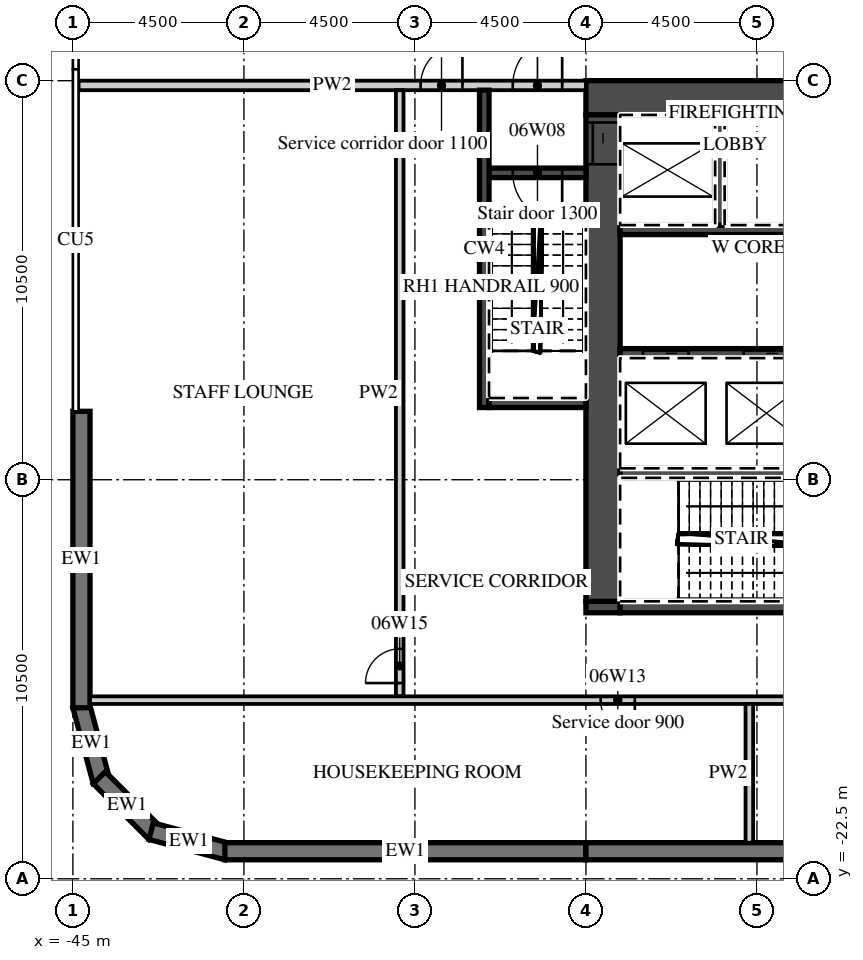
"""IFC4 building model, lengths in metres.
Left out: names, types, materials, properties, quantities, classifications, styles, units other than length and angle.
Written with IfcOpenShell. Run it as: python <this file> out.ifc"""

import sys

from ifc_helpers import new_model, si_unit, direction, frame, frame_2d, origin, place, context, subcontext, project, spatial, polyline, rectangle, outline, extrude, element, fill, save


model = new_model("IFC4")
c1 = context("Model", 3, precision=1e-05, world=origin(), true_north=direction((0.0, 1.0)))
c2 = subcontext(c1, "Body", "Model", "MODEL_VIEW")
j1 = project(units=[si_unit("LENGTHUNIT", "METRE"), si_unit("PLANEANGLEUNIT", "RADIAN")], contexts=[c1])
p1 = place(None, origin())
s1 = spatial("IfcSite", under=j1, at=p1, CompositionType="ELEMENT")
p2 = place(p1, origin())
s2 = spatial("IfcBuilding", under=s1, at=p2, CompositionType="ELEMENT")
p3 = place(p2, frame((0.0, 0.0, 38.0)))
s3 = spatial("IfcBuildingStorey", under=s2, at=p3, CompositionType="ELEMENT", Elevation=38.0)
p4 = place(p3, frame((-44.783, -17.942, 0.0), z_axis=(0.0, 0.0, 1.0), x_axis=(0.25881466832, -0.965926999034, 0.0)))
e1 = element("IfcWall", 1, at=p4, inside=s3, PredefinedType="SOLIDWALL", context=c2, shape_type="SweptSolid", body=[
    extrude(outline(polyline([(0.0, -0.225), (2.071, -0.225), (1.95, 0.225), (0.121, 0.225), (0.0, -0.225)])), origin(), (0.0, 0.0, 1.0), 8.7),
])
p5 = place(p3, frame((-44.305, -19.841, 0.0), z_axis=(0.0, 0.0, 1.0), x_axis=(0.707106781187, -0.707106781187, 0.0)))
e2 = element("IfcWall", 2, at=p5, inside=s3, PredefinedType="SOLIDWALL", context=c2, shape_type="SweptSolid", body=[
    extrude(outline(polyline([(0.0, -0.225), (2.071, -0.225), (1.95, 0.225), (0.121, 0.225), (0.0, -0.225)])), origin(), (0.0, 0.0, 1.0), 8.7),
])
p6 = place(p3, frame((-42.942, -21.247, 0.0), z_axis=(0.0, 0.0, 1.0), x_axis=(0.965926999034, -0.25881466832, 0.0)))
e3 = element("IfcWall", 3, at=p6, inside=s3, PredefinedType="SOLIDWALL", context=c2, shape_type="SweptSolid", body=[
    extrude(outline(polyline([(-0.0, -0.225), (2.07, -0.225), (1.95, 0.225), (0.12, 0.225), (-0.0, -0.225)])), origin(), (0.0, 0.0, 1.0), 8.7),
])
p7 = place(p3, frame((-41.0, -21.775, 0.0), z_axis=(0.0, 0.0, 1.0), x_axis=(1.0, 0.0, 0.0)))
e4 = element("IfcWall", 4, at=p7, inside=s3, PredefinedType="SOLIDWALL", context=c2, shape_type="SweptSolid", body=[
    extrude(rectangle(XDim=9.5, YDim=0.45, at=frame_2d((4.75, 0.0))), origin(), (0.0, 0.0, 1.0), 8.7),
])
p8 = place(p3, frame((-31.5, -21.775, 0.0), z_axis=(0.0, 0.0, 1.0), x_axis=(1.0, 0.0, 0.0)))
e5 = element("IfcWall", 5, at=p8, inside=s3, PredefinedType="SOLIDWALL", context=c2, shape_type="SweptSolid", body=[
    extrude(rectangle(XDim=18.0, YDim=0.45, at=frame_2d((9.0, 0.0))), origin(), (0.0, 0.0, 1.0), 8.7),
])
p9 = place(p3, frame((-44.775, -10.2, 0.0), z_axis=(0.0, 0.0, 1.0), x_axis=(0.0, -1.0, 0.0)))
e6 = element("IfcWall", 6, at=p9, inside=s3, PredefinedType="SOLIDWALL", context=c2, shape_type="SweptSolid", body=[
    extrude(rectangle(XDim=7.8, YDim=0.45, at=frame_2d((3.9, 0.0))), origin(), (0.0, 0.0, 1.0), 8.7),
])
p10 = place(p3, frame((-31.5, -1.95, 0.0), z_axis=(0.0, 0.0, 1.0), x_axis=(1.0, 0.0, 0.0)))
e7 = element("IfcWall", 7, at=p10, inside=s3, PredefinedType="SHEAR", context=c2, shape_type="SweptSolid", body=[
    extrude(rectangle(XDim=18.0, YDim=0.9, at=frame_2d((9.0, 0.0))), origin(), (0.0, 0.0, 1.0), 8.7),
])
p11 = place(p10, frame((14.725, 0.0, 0.0)))
e8 = element("IfcOpeningElement", 8, at=p11, cuts=e7, PredefinedType="OPENING", context=c2, shape_type="SweptSolid", body=[
    extrude(rectangle(XDim=1.8, YDim=2.1, at=frame_2d((0.9, 1.05))), frame((0.0, 0.46, 0.0), z_axis=(0.0, -1.0, 0.0), x_axis=(1.0, 0.0, 0.0)), (0.0, 0.0, 1.0), 0.92),
])
p12 = place(p3, frame((-31.5, -15.35, 0.0), z_axis=(0.0, 0.0, 1.0), x_axis=(1.0, 0.0, 0.0)))
e9 = element("IfcWall", 9, at=p12, inside=s3, PredefinedType="SHEAR", context=c2, shape_type="SweptSolid", body=[
    extrude(rectangle(XDim=0.9, YDim=0.3, at=frame_2d((0.45, 0.0))), origin(), (0.0, 0.0, 1.0), 8.7),
])
p13 = place(p3, frame((-30.6, -15.35, 0.0), z_axis=(0.0, 0.0, 1.0), x_axis=(1.0, 0.0, 0.0)))
e10 = element("IfcWall", 10, at=p13, inside=s3, PredefinedType="SHEAR", context=c2, shape_type="SweptSolid", body=[
    extrude(rectangle(XDim=10.3, YDim=0.3, at=frame_2d((5.15, 0.0))), origin(), (0.0, 0.0, 1.0), 8.7),
])
p14 = place(p13, frame((5.0, 0.0, 0.0)))
e11 = element("IfcOpeningElement", 11, at=p14, cuts=e10, PredefinedType="OPENING", context=c2, shape_type="SweptSolid", body=[
    extrude(rectangle(XDim=1.3, YDim=2.1, at=frame_2d((0.65, 1.05))), frame((0.0, 0.16, 0.0), z_axis=(0.0, -1.0, 0.0), x_axis=(1.0, 0.0, 0.0)), (0.0, 0.0, 1.0), 0.32),
])
p15 = place(p13, frame((7.312, 0.0, 0.0)))
e12 = element("IfcOpeningElement", 12, at=p15, cuts=e10, PredefinedType="OPENING", context=c2, shape_type="SweptSolid", body=[
    extrude(rectangle(XDim=0.9, YDim=2.1, at=frame_2d((0.45, 1.05))), frame((0.0, 0.16, 0.0), z_axis=(0.0, -1.0, 0.0), x_axis=(1.0, 0.0, 0.0)), (0.0, 0.0, 1.0), 0.32),
])
p16 = place(p3, frame((-31.05, -15.2, 0.0), z_axis=(0.0, 0.0, 1.0), x_axis=(0.0, 1.0, 0.0)))
e13 = element("IfcWall", 13, at=p16, inside=s3, PredefinedType="SHEAR", context=c2, shape_type="SweptSolid", body=[
    extrude(rectangle(XDim=12.8, YDim=0.9, at=frame_2d((6.4, 0.0))), origin(), (0.0, 0.0, 1.0), 8.7),
])
p17 = place(p16, frame((11.5, 0.0, 0.0)))
e14 = element("IfcOpeningElement", 14, at=p17, cuts=e13, PredefinedType="OPENING", context=c2, shape_type="SweptSolid", body=[
    extrude(rectangle(XDim=1.1, YDim=2.1, at=frame_2d((0.55, 1.05))), frame((0.0, 0.46, 0.0), z_axis=(0.0, -1.0, 0.0), x_axis=(1.0, 0.0, 0.0)), (0.0, 0.0, 1.0), 0.92),
])
p18 = place(p3, frame((-30.6, -5.425, 0.0), z_axis=(0.0, 0.0, 1.0), x_axis=(1.0, 0.0, 0.0)))
e15 = element("IfcWall", 15, at=p18, inside=s3, PredefinedType="SHEAR", context=c2, shape_type="SweptSolid", body=[
    extrude(rectangle(XDim=13.0, YDim=0.25, at=frame_2d((6.5, 0.0))), origin(), (0.0, 0.0, 1.0), 8.7),
])
p19 = place(p3, frame((-27.975, -5.3, 0.0), z_axis=(0.0, 0.0, 1.0), x_axis=(0.0, 1.0, 0.0)))
e16 = element("IfcWall", 16, at=p19, inside=s3, PredefinedType="SHEAR", context=c2, shape_type="SweptSolid", body=[
    extrude(rectangle(XDim=2.9, YDim=0.25, at=frame_2d((1.45, 0.0))), origin(), (0.0, 0.0, 1.0), 8.7),
])
p20 = place(p3, frame((-30.6, -8.675, 0.0), z_axis=(0.0, 0.0, 1.0), x_axis=(1.0, 0.0, 0.0)))
e17 = element("IfcWall", 17, at=p20, inside=s3, PredefinedType="SHEAR", context=c2, shape_type="SweptSolid", body=[
    extrude(rectangle(XDim=16.2, YDim=0.25, at=frame_2d((8.1, 0.0))), origin(), (0.0, 0.0, 1.0), 8.7),
])
p21 = place(p20, frame((0.6, 0.0, 0.0)))
e18 = element("IfcOpeningElement", 18, at=p21, cuts=e17, PredefinedType="OPENING", context=c2, shape_type="SweptSolid", body=[
    extrude(rectangle(XDim=1.2, YDim=2.1, at=frame_2d((0.6, 1.05))), frame((0.0, 0.135, 0.0), z_axis=(0.0, -1.0, 0.0), x_axis=(1.0, 0.0, 0.0)), (0.0, 0.0, 1.0), 0.27),
])
p22 = place(p20, frame((3.25, 0.0, 0.0)))
e19 = element("IfcOpeningElement", 19, at=p22, cuts=e17, PredefinedType="OPENING", context=c2, shape_type="SweptSolid", body=[
    extrude(rectangle(XDim=1.2, YDim=2.1, at=frame_2d((0.6, 1.05))), frame((0.0, 0.135, 0.0), z_axis=(0.0, -1.0, 0.0), x_axis=(1.0, 0.0, 0.0)), (0.0, 0.0, 1.0), 0.27),
])
p23 = place(p20, frame((5.9, 0.0, 0.0)))
e20 = element("IfcOpeningElement", 20, at=p23, cuts=e17, PredefinedType="OPENING", context=c2, shape_type="SweptSolid", body=[
    extrude(rectangle(XDim=1.2, YDim=2.1, at=frame_2d((0.6, 1.05))), frame((0.0, 0.135, 0.0), z_axis=(0.0, -1.0, 0.0), x_axis=(1.0, 0.0, 0.0)), (0.0, 0.0, 1.0), 0.27),
])
p24 = place(p20, frame((14.25, 0.0, 0.0)))
e21 = element("IfcOpeningElement", 21, at=p24, cuts=e17, PredefinedType="OPENING", context=c2, shape_type="SweptSolid", body=[
    extrude(rectangle(XDim=1.3, YDim=2.1, at=frame_2d((0.65, 1.05))), frame((0.0, 0.135, 0.0), z_axis=(0.0, -1.0, 0.0), x_axis=(1.0, 0.0, 0.0)), (0.0, 0.0, 1.0), 0.27),
])
p25 = place(p3, frame((-30.6, -11.825, 0.0), z_axis=(0.0, 0.0, 1.0), x_axis=(1.0, 0.0, 0.0)))
e22 = element("IfcWall", 22, at=p25, inside=s3, PredefinedType="SHEAR", context=c2, shape_type="SweptSolid", body=[
    extrude(rectangle(XDim=13.25, YDim=0.25, at=frame_2d((6.625, 0.0))), origin(), (0.0, 0.0, 1.0), 8.7),
])
p26 = place(p3, frame((-44.85, -1.625, 0.0), z_axis=(0.0, 0.0, 1.0), x_axis=(1.0, 0.0, 0.0)))
e23 = element("IfcWall", 23, at=p26, inside=s3, PredefinedType="PARTITIONING", context=c2, shape_type="SweptSolid", body=[
    extrude(rectangle(XDim=13.35, YDim=0.25, at=frame_2d((6.675, 0.0))), origin(), (0.0, 0.0, 1.0), 8.7),
])
p27 = place(p26, frame((11.425, 0.0, 0.0)))
e24 = element("IfcOpeningElement", 24, at=p27, cuts=e23, PredefinedType="OPENING", context=c2, shape_type="SweptSolid", body=[
    extrude(rectangle(XDim=1.3, YDim=2.1, at=frame_2d((0.65, 1.05))), frame((0.0, 0.135, 0.0), z_axis=(0.0, -1.0, 0.0), x_axis=(1.0, 0.0, 0.0)), (0.0, 0.0, 1.0), 0.27),
])
p28 = place(p26, frame((9.0, 0.0, 0.0)))
e25 = element("IfcOpeningElement", 25, at=p28, cuts=e23, PredefinedType="OPENING", context=c2, shape_type="SweptSolid", body=[
    extrude(rectangle(XDim=1.1, YDim=2.1, at=frame_2d((0.55, 1.05))), frame((0.0, 0.135, 0.0), z_axis=(0.0, -1.0, 0.0), x_axis=(1.0, 0.0, 0.0)), (0.0, 0.0, 1.0), 0.27),
])
p29 = place(p3, frame((-34.05, -3.925, 0.0), z_axis=(0.0, 0.0, 1.0), x_axis=(1.0, 0.0, 0.0)))
e26 = element("IfcWall", 26, at=p29, inside=s3, PredefinedType="SHEAR", context=c2, shape_type="SweptSolid", body=[
    extrude(rectangle(XDim=2.55, YDim=0.25, at=frame_2d((1.275, 0.0))), origin(), (0.0, 0.0, 1.0), 8.7),
])
p30 = place(p29, frame((0.625, 0.0, 0.0)))
e27 = element("IfcOpeningElement", 27, at=p30, cuts=e26, PredefinedType="OPENING", context=c2, shape_type="SweptSolid", body=[
    extrude(rectangle(XDim=1.3, YDim=2.1, at=frame_2d((0.65, 1.05))), frame((0.0, 0.135, 0.0), z_axis=(0.0, -1.0, 0.0), x_axis=(1.0, 0.0, 0.0)), (0.0, 0.0, 1.0), 0.27),
])
p31 = place(p3, frame((-34.175, -10.1, 0.0), z_axis=(0.0, 0.0, 1.0), x_axis=(0.0, 1.0, 0.0)))
e28 = element("IfcWall", 28, at=p31, inside=s3, PredefinedType="SHEAR", context=c2, shape_type="SweptSolid", body=[
    extrude(rectangle(XDim=8.35, YDim=0.25, at=frame_2d((4.175, 0.0))), origin(), (0.0, 0.0, 1.0), 8.7),
])
p32 = place(p3, frame((-34.05, -9.975, 0.0), z_axis=(0.0, 0.0, 1.0), x_axis=(1.0, 0.0, 0.0)))
e29 = element("IfcWall", 29, at=p32, inside=s3, PredefinedType="SHEAR", context=c2, shape_type="SweptSolid", body=[
    extrude(rectangle(XDim=2.55, YDim=0.25, at=frame_2d((1.275, 0.0))), origin(), (0.0, 0.0, 1.0), 8.7),
])
p33 = place(p3, frame((-36.4, -17.7, 0.0), z_axis=(0.0, 0.0, 1.0), x_axis=(0.0, 1.0, 0.0)))
e30 = element("IfcWall", 30, at=p33, inside=s3, PredefinedType="PARTITIONING", context=c2, shape_type="SweptSolid", body=[
    extrude(rectangle(XDim=15.95, YDim=0.2, at=frame_2d((7.975, 0.0))), origin(), (0.0, 0.0, 1.0), 8.7),
])
p34 = place(p33, frame((0.35, 0.0, 0.0)))
e31 = element("IfcOpeningElement", 31, at=p34, cuts=e30, PredefinedType="OPENING", context=c2, shape_type="SweptSolid", body=[
    extrude(rectangle(XDim=0.9, YDim=2.1, at=frame_2d((0.45, 1.05))), frame((0.0, 0.11, 0.0), z_axis=(0.0, -1.0, 0.0), x_axis=(1.0, 0.0, 0.0)), (0.0, 0.0, 1.0), 0.22),
])
p35 = place(p3, frame((-44.55, -17.8, 0.0), z_axis=(0.0, 0.0, 1.0), x_axis=(1.0, 0.0, 0.0)))
e32 = element("IfcWall", 32, at=p35, inside=s3, PredefinedType="PARTITIONING", context=c2, shape_type="SweptSolid", body=[
    extrude(rectangle(XDim=30.95, YDim=0.2, at=frame_2d((15.475, 0.0))), origin(), (0.0, 0.0, 1.0), 8.7),
])
p36 = place(p35, frame((13.438, 0.0, 0.0)))
e33 = element("IfcOpeningElement", 33, at=p36, cuts=e32, PredefinedType="OPENING", context=c2, shape_type="SweptSolid", body=[
    extrude(rectangle(XDim=0.9, YDim=2.1, at=frame_2d((0.45, 1.05))), frame((0.0, 0.11, 0.0), z_axis=(0.0, -1.0, 0.0), x_axis=(1.0, 0.0, 0.0)), (0.0, 0.0, 1.0), 0.22),
])
p37 = place(p35, frame((21.738, 0.0, 0.0)))
e34 = element("IfcOpeningElement", 34, at=p37, cuts=e32, PredefinedType="OPENING", context=c2, shape_type="SweptSolid", body=[
    extrude(rectangle(XDim=0.9, YDim=2.1, at=frame_2d((0.45, 1.05))), frame((0.0, 0.11, 0.0), z_axis=(0.0, -1.0, 0.0), x_axis=(1.0, 0.0, 0.0)), (0.0, 0.0, 1.0), 0.22),
])
p38 = place(p3, frame((-27.2, -21.55, 0.0), z_axis=(0.0, 0.0, 1.0), x_axis=(0.0, 1.0, 0.0)))
e35 = element("IfcWall", 35, at=p38, inside=s3, PredefinedType="PARTITIONING", context=c2, shape_type="SweptSolid", body=[
    extrude(rectangle(XDim=3.65, YDim=0.2, at=frame_2d((1.825, 0.0))), origin(), (0.0, 0.0, 1.0), 8.7),
])
p39 = place(p21, origin())
e36 = element("IfcDoor", 36, at=p39, inside=s3, OperationType="SLIDING_TO_LEFT", PredefinedType="DOOR", context=c2, shape_type="SweptSolid", body=[
    extrude(rectangle(XDim=1.2, YDim=2.1, at=frame_2d((0.6, 1.05))), frame((0.0, 0.025, 0.0), z_axis=(0.0, -1.0, 0.0), x_axis=(1.0, 0.0, 0.0)), (0.0, 0.0, 1.0), 0.05),
])
fill(e18, e36)
p40 = place(p22, origin())
e37 = element("IfcDoor", 37, at=p40, inside=s3, OperationType="SLIDING_TO_RIGHT", PredefinedType="DOOR", context=c2, shape_type="SweptSolid", body=[
    extrude(rectangle(XDim=1.2, YDim=2.1, at=frame_2d((0.6, 1.05))), frame((0.0, 0.025, 0.0), z_axis=(0.0, -1.0, 0.0), x_axis=(1.0, 0.0, 0.0)), (0.0, 0.0, 1.0), 0.05),
])
fill(e19, e37)
p41 = place(p17, origin())
e38 = element("IfcDoor", 38, at=p41, inside=s3, OperationType="SLIDING_TO_RIGHT", PredefinedType="DOOR", context=c2, shape_type="SweptSolid", body=[
    extrude(rectangle(XDim=1.1, YDim=2.1, at=frame_2d((0.55, 1.05))), frame((0.0, 0.025, 0.0), z_axis=(0.0, -1.0, 0.0), x_axis=(1.0, 0.0, 0.0)), (0.0, 0.0, 1.0), 0.05),
])
fill(e14, e38)
p42 = place(p27, origin())
e39 = element("IfcDoor", 39, at=p42, inside=s3, OperationType="SINGLE_SWING_RIGHT", PredefinedType="DOOR", context=c2, shape_type="SweptSolid", body=[
    extrude(rectangle(XDim=1.3, YDim=2.1, at=frame_2d((0.65, 1.05))), frame((0.0, 0.025, 0.0), z_axis=(0.0, -1.0, 0.0), x_axis=(1.0, 0.0, 0.0)), (0.0, 0.0, 1.0), 0.05),
])
fill(e24, e39)
p43 = place(p30, origin())
e40 = element("IfcDoor", 40, at=p43, inside=s3, OperationType="SINGLE_SWING_RIGHT", PredefinedType="DOOR", context=c2, shape_type="SweptSolid", body=[
    extrude(rectangle(XDim=1.3, YDim=2.1, at=frame_2d((0.65, 1.05))), frame((0.0, 0.025, 0.0), z_axis=(0.0, -1.0, 0.0), x_axis=(1.0, 0.0, 0.0)), (0.0, 0.0, 1.0), 0.05),
])
fill(e27, e40)
p44 = place(p28, origin())
e41 = element("IfcDoor", 41, at=p44, inside=s3, OperationType="SINGLE_SWING_RIGHT", PredefinedType="DOOR", context=c2, shape_type="SweptSolid", body=[
    extrude(rectangle(XDim=1.1, YDim=2.1, at=frame_2d((0.55, 1.05))), frame((0.0, 0.025, 0.0), z_axis=(0.0, -1.0, 0.0), x_axis=(1.0, 0.0, 0.0)), (0.0, 0.0, 1.0), 0.05),
])
fill(e25, e41)
p45 = place(p36, origin())
e42 = element("IfcDoor", 42, at=p45, inside=s3, OperationType="SINGLE_SWING_RIGHT", PredefinedType="DOOR", context=c2, shape_type="SweptSolid", body=[
    extrude(rectangle(XDim=0.9, YDim=2.1, at=frame_2d((0.45, 1.05))), frame((0.0, 0.025, 0.0), z_axis=(0.0, -1.0, 0.0), x_axis=(1.0, 0.0, 0.0)), (0.0, 0.0, 1.0), 0.05),
])
fill(e33, e42)
p46 = place(p34, origin())
e43 = element("IfcDoor", 43, at=p46, inside=s3, OperationType="SINGLE_SWING_LEFT", PredefinedType="DOOR", context=c2, shape_type="SweptSolid", body=[
    extrude(rectangle(XDim=0.9, YDim=2.1, at=frame_2d((0.45, 1.05))), frame((0.0, 0.025, 0.0), z_axis=(0.0, -1.0, 0.0), x_axis=(1.0, 0.0, 0.0)), (0.0, 0.0, 1.0), 0.05),
])
fill(e31, e43)
save(model, sys.argv[1])
